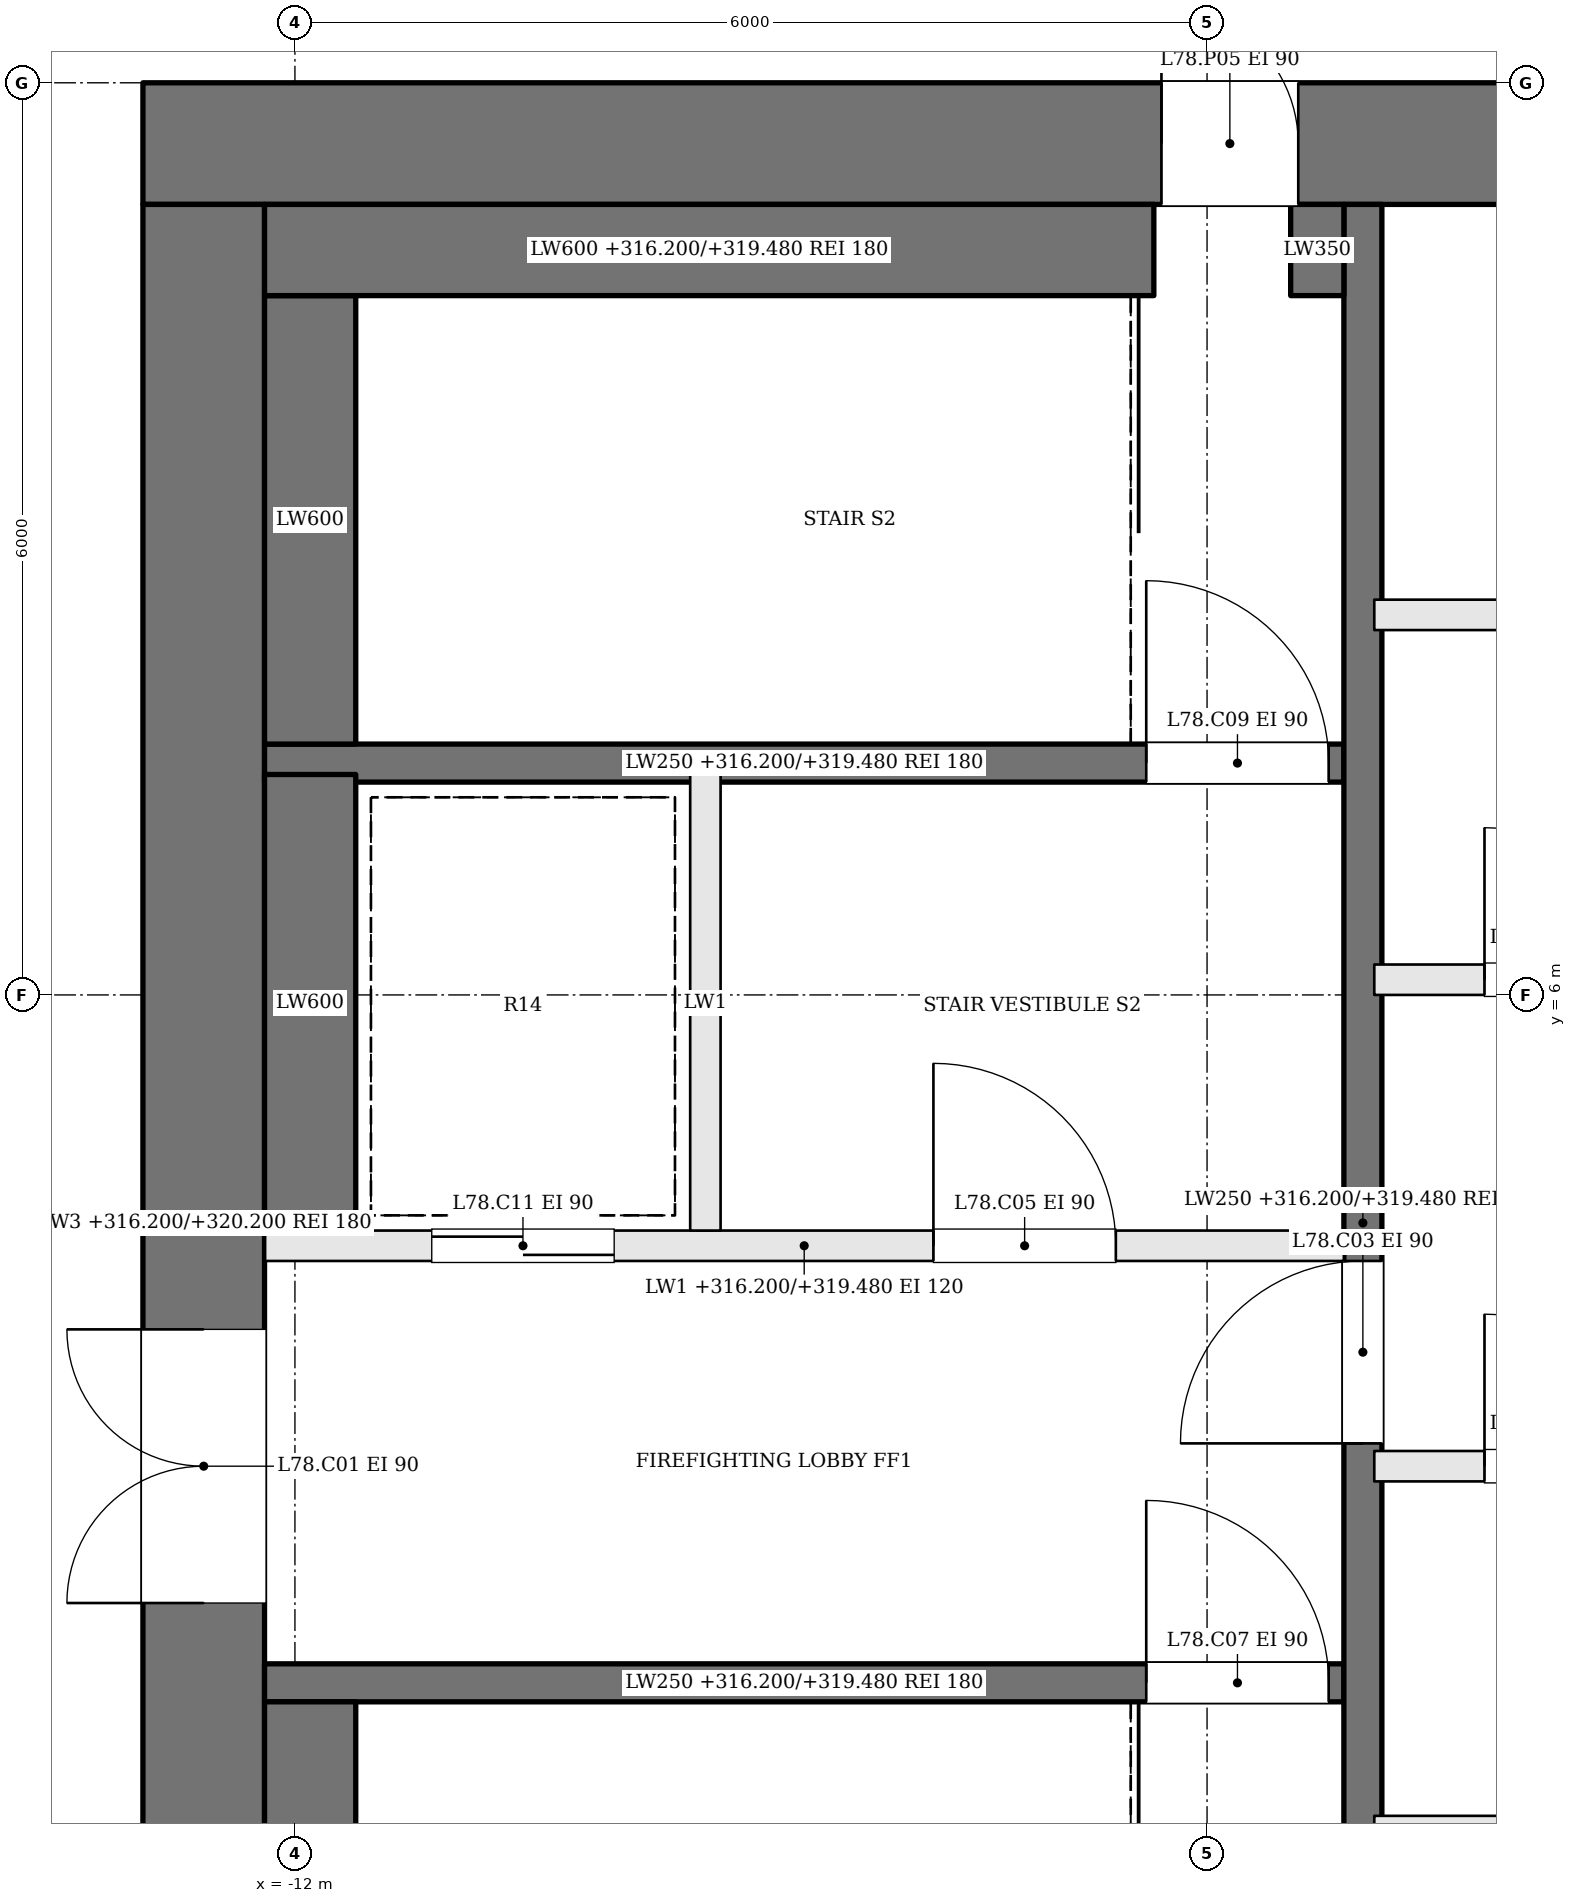
"""IFC4 building model, lengths in metres.
Left out: names, types, materials, properties, quantities, classifications, styles, units other than length and angle.
Written with IfcOpenShell. Run it as: python <this file> out.ifc"""

import sys

from ifc_helpers import new_model, si_unit, direction, frame, frame_2d, origin, place, context, subcontext, project, spatial, rectangle, extrude, element, fill, save


model = new_model("IFC4")
c1 = context("Model", 3, precision=1e-05, world=origin(), true_north=direction((0.0, 1.0)))
c2 = subcontext(c1, "Body", "Model", "MODEL_VIEW")
j1 = project(units=[si_unit("LENGTHUNIT", "METRE"), si_unit("PLANEANGLEUNIT", "RADIAN")], contexts=[c1])
p1 = place(None, origin())
s1 = spatial("IfcSite", under=j1, at=p1, CompositionType="ELEMENT")
p2 = place(p1, origin())
s2 = spatial("IfcBuilding", under=s1, at=p2, CompositionType="ELEMENT")
p3 = place(p2, frame((0.0, 0.0, 316.2)))
s3 = spatial("IfcBuildingStorey", under=s2, at=p3, CompositionType="ELEMENT", Elevation=316.2)
p4 = place(p3, frame((-13.0, 11.6, 0.0), z_axis=(0.0, 0.0, 1.0), x_axis=(1.0, 0.0, 0.0)))
e1 = element("IfcWall", 1, at=p4, inside=s3, PredefinedType="SHEAR", context=c2, shape_type="SweptSolid", body=[
    extrude(rectangle(XDim=26.0, YDim=0.8, at=frame_2d((13.0, 0.0))), origin(), (0.0, 0.0, 1.0), 4.0),
])
p5 = place(p4, frame((9.375, 0.0, 0.0)))
e2 = element("IfcOpeningElement", 2, at=p5, cuts=e1, PredefinedType="OPENING", context=c2, shape_type="SweptSolid", body=[
    extrude(rectangle(XDim=0.7, YDim=2.1, at=frame_2d((0.35, 1.05))), frame((0.0, 0.41, 0.0), z_axis=(0.0, -1.0, 0.0), x_axis=(1.0, 0.0, 0.0)), (0.0, 0.0, 1.0), 0.82),
])
p6 = place(p4, frame((12.375, 0.0, 0.0)))
e3 = element("IfcOpeningElement", 3, at=p6, cuts=e1, PredefinedType="OPENING", context=c2, shape_type="SweptSolid", body=[
    extrude(rectangle(XDim=1.2, YDim=2.1, at=frame_2d((0.6, 1.05))), frame((0.0, 0.41, 0.0), z_axis=(0.0, -1.0, 0.0), x_axis=(1.0, 0.0, 0.0)), (0.0, 0.0, 1.0), 0.82),
])
p7 = place(p4, frame((15.9, 0.0, 0.0)))
e4 = element("IfcOpeningElement", 4, at=p7, cuts=e1, PredefinedType="OPENING", context=c2, shape_type="SweptSolid", body=[
    extrude(rectangle(XDim=0.7, YDim=2.1, at=frame_2d((0.35, 1.05))), frame((0.0, 0.41, 0.0), z_axis=(0.0, -1.0, 0.0), x_axis=(1.0, 0.0, 0.0)), (0.0, 0.0, 1.0), 0.82),
])
p8 = place(p4, frame((6.7, 0.0, 0.0)))
e5 = element("IfcOpeningElement", 5, at=p8, cuts=e1, PredefinedType="OPENING", context=c2, shape_type="SweptSolid", body=[
    extrude(rectangle(XDim=0.9, YDim=2.1, at=frame_2d((0.45, 1.05))), frame((0.0, 0.41, 0.0), z_axis=(0.0, -1.0, 0.0), x_axis=(1.0, 0.0, 0.0)), (0.0, 0.0, 1.0), 0.82),
])
p9 = place(p3, frame((-12.6, -2.2, 0.0), z_axis=(0.0, 0.0, 1.0), x_axis=(0.0, 1.0, 0.0)))
e6 = element("IfcWall", 6, at=p9, inside=s3, PredefinedType="SHEAR", context=c2, shape_type="SweptSolid", body=[
    extrude(rectangle(XDim=13.4, YDim=0.8, at=frame_2d((6.7, 0.0))), origin(), (0.0, 0.0, 1.0), 4.0),
])
p10 = place(p9, frame((4.2, 0.0, 0.0)))
e7 = element("IfcOpeningElement", 7, at=p10, cuts=e6, PredefinedType="OPENING", context=c2, shape_type="SweptSolid", body=[
    extrude(rectangle(XDim=1.8, YDim=2.1, at=frame_2d((0.9, 1.05))), frame((0.0, 0.41, 0.0), z_axis=(0.0, -1.0, 0.0), x_axis=(1.0, 0.0, 0.0)), (0.0, 0.0, 1.0), 0.82),
])
p11 = place(p3, frame((-12.2, 1.475, 0.0), z_axis=(0.0, 0.0, 1.0), x_axis=(1.0, 0.0, 0.0)))
e8 = element("IfcWall", 8, at=p11, inside=s3, PredefinedType="SOLIDWALL", context=c2, shape_type="SweptSolid", body=[
    extrude(rectangle(XDim=7.1, YDim=0.25, at=frame_2d((3.55, 0.0))), origin(), (0.0, 0.0, 1.0), 3.28),
])
p12 = place(p11, frame((5.8, 0.0, 0.0)))
e9 = element("IfcOpeningElement", 9, at=p12, cuts=e8, PredefinedType="OPENING", context=c2, shape_type="SweptSolid", body=[
    extrude(rectangle(XDim=1.2, YDim=2.1, at=frame_2d((0.6, 1.05))), frame((0.0, 0.135, 0.0), z_axis=(0.0, -1.0, 0.0), x_axis=(1.0, 0.0, 0.0)), (0.0, 0.0, 1.0), 0.27),
])
p13 = place(p3, frame((-12.2, 4.35, 0.0), z_axis=(0.0, 0.0, 1.0), x_axis=(1.0, 0.0, 0.0)))
e10 = element("IfcWall", 10, at=p13, inside=s3, PredefinedType="SOLIDWALL", context=c2, shape_type="SweptSolid", body=[
    extrude(rectangle(XDim=7.1, YDim=0.2, at=frame_2d((3.55, 0.0))), origin(), (0.0, 0.0, 1.0), 3.28),
])
p14 = place(p13, frame((4.4, 0.0, 0.0)))
e11 = element("IfcOpeningElement", 11, at=p14, cuts=e10, PredefinedType="OPENING", context=c2, shape_type="SweptSolid", body=[
    extrude(rectangle(XDim=1.2, YDim=2.1, at=frame_2d((0.6, 1.05))), frame((0.0, 0.11, 0.0), z_axis=(0.0, -1.0, 0.0), x_axis=(1.0, 0.0, 0.0)), (0.0, 0.0, 1.0), 0.22),
])
p15 = place(p13, frame((1.1, 0.0, 0.0)))
e12 = element("IfcOpeningElement", 12, at=p15, cuts=e10, PredefinedType="OPENING", context=c2, shape_type="SweptSolid", body=[
    extrude(rectangle(XDim=1.2, YDim=2.1, at=frame_2d((0.6, 1.05))), frame((0.0, 0.11, 0.0), z_axis=(0.0, -1.0, 0.0), x_axis=(1.0, 0.0, 0.0)), (0.0, 0.0, 1.0), 0.22),
])
p16 = place(p3, frame((-12.2, 7.525, 0.0), z_axis=(0.0, 0.0, 1.0), x_axis=(1.0, 0.0, 0.0)))
e13 = element("IfcWall", 13, at=p16, inside=s3, PredefinedType="SOLIDWALL", context=c2, shape_type="SweptSolid", body=[
    extrude(rectangle(XDim=7.1, YDim=0.25, at=frame_2d((3.55, 0.0))), origin(), (0.0, 0.0, 1.0), 3.28),
])
p17 = place(p16, frame((5.8, 0.0, 0.0)))
e14 = element("IfcOpeningElement", 14, at=p17, cuts=e13, PredefinedType="OPENING", context=c2, shape_type="SweptSolid", body=[
    extrude(rectangle(XDim=1.2, YDim=2.1, at=frame_2d((0.6, 1.05))), frame((0.0, 0.135, 0.0), z_axis=(0.0, -1.0, 0.0), x_axis=(1.0, 0.0, 0.0)), (0.0, 0.0, 1.0), 0.27),
])
p18 = place(p3, frame((-9.3, 4.45, 0.0), z_axis=(0.0, 0.0, 1.0), x_axis=(0.0, 1.0, 0.0)))
e15 = element("IfcWall", 15, at=p18, inside=s3, PredefinedType="SOLIDWALL", context=c2, shape_type="SweptSolid", body=[
    extrude(rectangle(XDim=3.0, YDim=0.2, at=frame_2d((1.5, 0.0))), origin(), (0.0, 0.0, 1.0), 3.28),
])
p19 = place(p3, frame((-4.975, -2.2, 0.0), z_axis=(0.0, 0.0, 1.0), x_axis=(0.0, 1.0, 0.0)))
e16 = element("IfcWall", 16, at=p19, inside=s3, PredefinedType="SOLIDWALL", context=c2, shape_type="SweptSolid", body=[
    extrude(rectangle(XDim=13.4, YDim=0.25, at=frame_2d((6.7, 0.0))), origin(), (0.0, 0.0, 1.0), 3.28),
])
p20 = place(p19, frame((5.25, 0.0, 0.0)))
e17 = element("IfcOpeningElement", 17, at=p20, cuts=e16, PredefinedType="OPENING", context=c2, shape_type="SweptSolid", body=[
    extrude(rectangle(XDim=1.2, YDim=2.1, at=frame_2d((0.6, 1.05))), frame((0.0, 0.135, 0.0), z_axis=(0.0, -1.0, 0.0), x_axis=(1.0, 0.0, 0.0)), (0.0, 0.0, 1.0), 0.27),
])
p21 = place(p3, frame((-11.9, -1.6, 0.0), z_axis=(0.0, 0.0, 1.0), x_axis=(0.0, 1.0, 0.0)))
e18 = element("IfcWall", 18, at=p21, inside=s3, PredefinedType="SOLIDWALL", context=c2, shape_type="SweptSolid", body=[
    extrude(rectangle(XDim=2.95, YDim=0.6, at=frame_2d((1.475, 0.0))), origin(), (0.0, 0.0, 1.0), 3.28),
])
p22 = place(p3, frame((-11.9, 4.45, 0.0), z_axis=(0.0, 0.0, 1.0), x_axis=(0.0, 1.0, 0.0)))
e19 = element("IfcWall", 19, at=p22, inside=s3, PredefinedType="SOLIDWALL", context=c2, shape_type="SweptSolid", body=[
    extrude(rectangle(XDim=3.0, YDim=0.6, at=frame_2d((1.5, 0.0))), origin(), (0.0, 0.0, 1.0), 3.28),
])
p23 = place(p3, frame((-11.9, 7.65, 0.0), z_axis=(0.0, 0.0, 1.0), x_axis=(0.0, 1.0, 0.0)))
e20 = element("IfcWall", 20, at=p23, inside=s3, PredefinedType="SOLIDWALL", context=c2, shape_type="SweptSolid", body=[
    extrude(rectangle(XDim=2.95, YDim=0.6, at=frame_2d((1.475, 0.0))), origin(), (0.0, 0.0, 1.0), 3.28),
])
p24 = place(p3, frame((-12.2, 10.9, 0.0), z_axis=(0.0, 0.0, 1.0), x_axis=(1.0, 0.0, 0.0)))
e21 = element("IfcWall", 21, at=p24, inside=s3, PredefinedType="SOLIDWALL", context=c2, shape_type="SweptSolid", body=[
    extrude(rectangle(XDim=5.85, YDim=0.6, at=frame_2d((2.925, 0.0))), origin(), (0.0, 0.0, 1.0), 3.28),
])
p25 = place(p3, frame((-5.275, 10.6, 0.0), z_axis=(0.0, 0.0, 1.0), x_axis=(0.0, 1.0, 0.0)))
e22 = element("IfcWall", 22, at=p25, inside=s3, PredefinedType="SOLIDWALL", context=c2, shape_type="SweptSolid", body=[
    extrude(rectangle(XDim=0.6, YDim=0.35, at=frame_2d((0.3, 0.0))), origin(), (0.0, 0.0, 1.0), 3.28),
])
p26 = place(p3, frame((-4.9, 0.5, 0.0), z_axis=(0.0, 0.0, 1.0), x_axis=(1.0, 0.0, 0.0)))
e23 = element("IfcWall", 23, at=p26, inside=s3, PredefinedType="SOLIDWALL", context=c2, shape_type="SweptSolid", body=[
    extrude(rectangle(XDim=9.8, YDim=0.2, at=frame_2d((4.9, 0.0))), origin(), (0.0, 0.0, 1.0), 3.28),
])
p27 = place(p3, frame((-4.9, 2.9, 0.0), z_axis=(0.0, 0.0, 1.0), x_axis=(1.0, 0.0, 0.0)))
e24 = element("IfcWall", 24, at=p27, inside=s3, PredefinedType="SOLIDWALL", context=c2, shape_type="SweptSolid", body=[
    extrude(rectangle(XDim=9.8, YDim=0.2, at=frame_2d((4.9, 0.0))), origin(), (0.0, 0.0, 1.0), 3.28),
])
p28 = place(p27, frame((0.725, 0.0, 0.0)))
e25 = element("IfcOpeningElement", 25, at=p28, cuts=e24, PredefinedType="OPENING", context=c2, shape_type="SweptSolid", body=[
    extrude(rectangle(XDim=1.0, YDim=2.1, at=frame_2d((0.5, 1.05))), frame((0.0, 0.11, 0.0), z_axis=(0.0, -1.0, 0.0), x_axis=(1.0, 0.0, 0.0)), (0.0, 0.0, 1.0), 0.22),
])
p29 = place(p27, frame((3.175, 0.0, 0.0)))
e26 = element("IfcOpeningElement", 26, at=p29, cuts=e24, PredefinedType="OPENING", context=c2, shape_type="SweptSolid", body=[
    extrude(rectangle(XDim=1.0, YDim=2.1, at=frame_2d((0.5, 1.05))), frame((0.0, 0.11, 0.0), z_axis=(0.0, -1.0, 0.0), x_axis=(1.0, 0.0, 0.0)), (0.0, 0.0, 1.0), 0.22),
])
p30 = place(p27, frame((5.525, 0.0, 0.0)))
e27 = element("IfcOpeningElement", 27, at=p30, cuts=e24, PredefinedType="OPENING", context=c2, shape_type="SweptSolid", body=[
    extrude(rectangle(XDim=1.2, YDim=2.1, at=frame_2d((0.6, 1.05))), frame((0.0, 0.11, 0.0), z_axis=(0.0, -1.0, 0.0), x_axis=(1.0, 0.0, 0.0)), (0.0, 0.0, 1.0), 0.22),
])
p31 = place(p27, frame((7.975, 0.0, 0.0)))
e28 = element("IfcOpeningElement", 28, at=p31, cuts=e24, PredefinedType="OPENING", context=c2, shape_type="SweptSolid", body=[
    extrude(rectangle(XDim=1.2, YDim=2.1, at=frame_2d((0.6, 1.05))), frame((0.0, 0.11, 0.0), z_axis=(0.0, -1.0, 0.0), x_axis=(1.0, 0.0, 0.0)), (0.0, 0.0, 1.0), 0.22),
])
p32 = place(p3, frame((-4.9, 6.1, 0.0), z_axis=(0.0, 0.0, 1.0), x_axis=(1.0, 0.0, 0.0)))
e29 = element("IfcWall", 29, at=p32, inside=s3, PredefinedType="SOLIDWALL", context=c2, shape_type="SweptSolid", body=[
    extrude(rectangle(XDim=9.8, YDim=0.2, at=frame_2d((4.9, 0.0))), origin(), (0.0, 0.0, 1.0), 3.28),
])
p33 = place(p32, frame((0.725, 0.0, 0.0)))
e30 = element("IfcOpeningElement", 30, at=p33, cuts=e29, PredefinedType="OPENING", context=c2, shape_type="SweptSolid", body=[
    extrude(rectangle(XDim=1.0, YDim=2.1, at=frame_2d((0.5, 1.05))), frame((0.0, 0.11, 0.0), z_axis=(0.0, -1.0, 0.0), x_axis=(1.0, 0.0, 0.0)), (0.0, 0.0, 1.0), 0.22),
])
p34 = place(p32, frame((3.175, 0.0, 0.0)))
e31 = element("IfcOpeningElement", 31, at=p34, cuts=e29, PredefinedType="OPENING", context=c2, shape_type="SweptSolid", body=[
    extrude(rectangle(XDim=1.0, YDim=2.1, at=frame_2d((0.5, 1.05))), frame((0.0, 0.11, 0.0), z_axis=(0.0, -1.0, 0.0), x_axis=(1.0, 0.0, 0.0)), (0.0, 0.0, 1.0), 0.22),
])
p35 = place(p32, frame((5.625, 0.0, 0.0)))
e32 = element("IfcOpeningElement", 32, at=p35, cuts=e29, PredefinedType="OPENING", context=c2, shape_type="SweptSolid", body=[
    extrude(rectangle(XDim=1.0, YDim=2.1, at=frame_2d((0.5, 1.05))), frame((0.0, 0.11, 0.0), z_axis=(0.0, -1.0, 0.0), x_axis=(1.0, 0.0, 0.0)), (0.0, 0.0, 1.0), 0.22),
])
p36 = place(p32, frame((8.075, 0.0, 0.0)))
e33 = element("IfcOpeningElement", 33, at=p36, cuts=e29, PredefinedType="OPENING", context=c2, shape_type="SweptSolid", body=[
    extrude(rectangle(XDim=1.0, YDim=2.1, at=frame_2d((0.5, 1.05))), frame((0.0, 0.11, 0.0), z_axis=(0.0, -1.0, 0.0), x_axis=(1.0, 0.0, 0.0)), (0.0, 0.0, 1.0), 0.22),
])
p37 = place(p3, frame((-4.9, 8.5, 0.0), z_axis=(0.0, 0.0, 1.0), x_axis=(1.0, 0.0, 0.0)))
e34 = element("IfcWall", 34, at=p37, inside=s3, PredefinedType="SOLIDWALL", context=c2, shape_type="SweptSolid", body=[
    extrude(rectangle(XDim=9.8, YDim=0.2, at=frame_2d((4.9, 0.0))), origin(), (0.0, 0.0, 1.0), 3.28),
])
p38 = place(p10, origin())
e35 = element("IfcDoor", 35, at=p38, inside=s3, OperationType="DOUBLE_DOOR_SINGLE_SWING", PredefinedType="DOOR", context=c2, shape_type="SweptSolid", body=[
    extrude(rectangle(XDim=1.8, YDim=2.1, at=frame_2d((0.9, 1.05))), frame((0.0, 0.025, 0.0), z_axis=(0.0, -1.0, 0.0), x_axis=(1.0, 0.0, 0.0)), (0.0, 0.0, 1.0), 0.05),
])
fill(e7, e35)
p39 = place(p20, origin())
e36 = element("IfcDoor", 36, at=p39, inside=s3, OperationType="SINGLE_SWING_LEFT", PredefinedType="DOOR", context=c2, shape_type="SweptSolid", body=[
    extrude(rectangle(XDim=1.2, YDim=2.1, at=frame_2d((0.6, 1.05))), frame((0.0, 0.025, 0.0), z_axis=(0.0, -1.0, 0.0), x_axis=(1.0, 0.0, 0.0)), (0.0, 0.0, 1.0), 0.05),
])
fill(e17, e36)
p40 = place(p14, origin())
e37 = element("IfcDoor", 37, at=p40, inside=s3, OperationType="SINGLE_SWING_LEFT", PredefinedType="DOOR", context=c2, shape_type="SweptSolid", body=[
    extrude(rectangle(XDim=1.2, YDim=2.1, at=frame_2d((0.6, 1.05))), frame((0.0, 0.025, 0.0), z_axis=(0.0, -1.0, 0.0), x_axis=(1.0, 0.0, 0.0)), (0.0, 0.0, 1.0), 0.05),
])
fill(e11, e37)
p41 = place(p12, origin())
e38 = element("IfcDoor", 38, at=p41, inside=s3, OperationType="SINGLE_SWING_LEFT", PredefinedType="DOOR", context=c2, shape_type="SweptSolid", body=[
    extrude(rectangle(XDim=1.2, YDim=2.1, at=frame_2d((0.6, 1.05))), frame((0.0, 0.025, 0.0), z_axis=(0.0, -1.0, 0.0), x_axis=(1.0, 0.0, 0.0)), (0.0, 0.0, 1.0), 0.05),
])
fill(e9, e38)
p42 = place(p17, origin())
e39 = element("IfcDoor", 39, at=p42, inside=s3, OperationType="SINGLE_SWING_LEFT", PredefinedType="DOOR", context=c2, shape_type="SweptSolid", body=[
    extrude(rectangle(XDim=1.2, YDim=2.1, at=frame_2d((0.6, 1.05))), frame((0.0, 0.025, 0.0), z_axis=(0.0, -1.0, 0.0), x_axis=(1.0, 0.0, 0.0)), (0.0, 0.0, 1.0), 0.05),
])
fill(e14, e39)
p43 = place(p15, origin())
e40 = element("IfcDoor", 40, at=p43, inside=s3, OperationType="SLIDING_TO_RIGHT", PredefinedType="DOOR", context=c2, shape_type="SweptSolid", body=[
    extrude(rectangle(XDim=1.2, YDim=2.1, at=frame_2d((0.6, 1.05))), frame((0.0, 0.025, 0.0), z_axis=(0.0, -1.0, 0.0), x_axis=(1.0, 0.0, 0.0)), (0.0, 0.0, 1.0), 0.05),
])
fill(e12, e40)
p44 = place(p28, origin())
e41 = element("IfcDoor", 41, at=p44, inside=s3, OperationType="SINGLE_SWING_LEFT", PredefinedType="DOOR", context=c2, shape_type="SweptSolid", body=[
    extrude(rectangle(XDim=1.0, YDim=2.1, at=frame_2d((0.5, 1.05))), frame((0.0, 0.025, 0.0), z_axis=(0.0, -1.0, 0.0), x_axis=(1.0, 0.0, 0.0)), (0.0, 0.0, 1.0), 0.05),
])
fill(e25, e41)
p45 = place(p33, origin())
e42 = element("IfcDoor", 42, at=p45, inside=s3, OperationType="SINGLE_SWING_LEFT", PredefinedType="DOOR", context=c2, shape_type="SweptSolid", body=[
    extrude(rectangle(XDim=1.0, YDim=2.1, at=frame_2d((0.5, 1.05))), frame((0.0, 0.025, 0.0), z_axis=(0.0, -1.0, 0.0), x_axis=(1.0, 0.0, 0.0)), (0.0, 0.0, 1.0), 0.05),
])
fill(e30, e42)
p46 = place(p8, origin())
e43 = element("IfcDoor", 43, at=p46, inside=s3, OperationType="SINGLE_SWING_LEFT", PredefinedType="DOOR", context=c2, shape_type="SweptSolid", body=[
    extrude(rectangle(XDim=0.9, YDim=2.1, at=frame_2d((0.45, 1.05))), frame((0.0, 0.025, 0.0), z_axis=(0.0, -1.0, 0.0), x_axis=(1.0, 0.0, 0.0)), (0.0, 0.0, 1.0), 0.05),
])
fill(e5, e43)
save(model, sys.argv[1])
